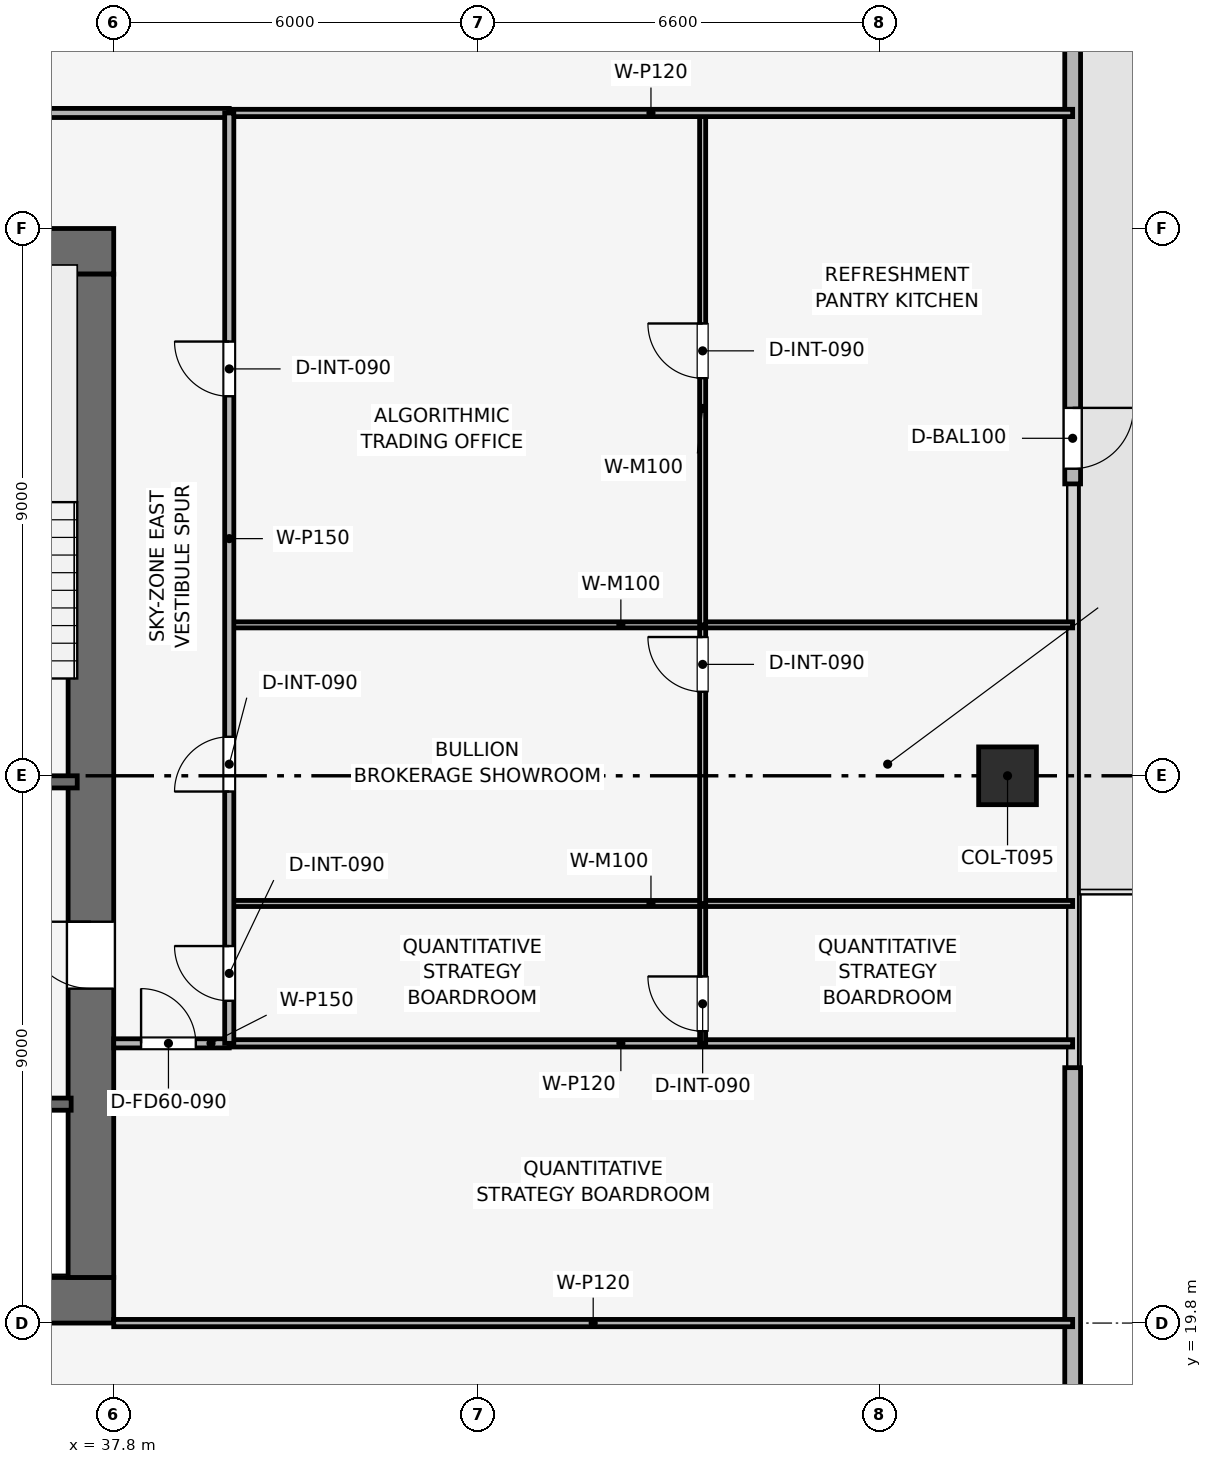
"""IFC4 building model, lengths in metres.
Left out: names, types, materials, properties, quantities, classifications, styles, units other than length and angle.
Written with IfcOpenShell. Run it as: python <this file> out.ifc"""

import sys

from ifc_helpers import new_model, si_unit, direction, frame, frame_2d, origin, origin_2d, place, context, subcontext, project, spatial, rectangle, extrude, element, fill, save


model = new_model("IFC4")
c1 = context("Model", 3, precision=1e-05, world=origin(), true_north=direction((0.0, 1.0)))
c2 = subcontext(c1, "Body", "Model", "MODEL_VIEW")
j1 = project(units=[si_unit("LENGTHUNIT", "METRE"), si_unit("PLANEANGLEUNIT", "RADIAN")], contexts=[c1])
p1 = place(None, origin())
s1 = spatial("IfcSite", under=j1, at=p1, CompositionType="ELEMENT")
p2 = place(p1, origin())
s2 = spatial("IfcBuilding", under=s1, at=p2, CompositionType="ELEMENT")
p3 = place(p2, frame((0.0, 0.0, 280.35)))
s3 = spatial("IfcBuildingStorey", under=s2, at=p3, CompositionType="ELEMENT", Elevation=280.35)
p4 = place(p3, frame((19.8, 20.175, 0.0), z_axis=(0.0, 0.0, 1.0), x_axis=(1.0, 0.0, 0.0)))
e1 = element("IfcWall", 1, at=p4, inside=s3, PredefinedType="SHEAR", context=c2, shape_type="SweptSolid", body=[
    extrude(rectangle(XDim=18.0, YDim=0.75, at=frame_2d((9.0, 0.0))), origin(), (0.0, 0.0, 1.0), 3.75),
])
p5 = place(p3, frame((19.8, 37.425, 0.0), z_axis=(0.0, 0.0, 1.0), x_axis=(1.0, 0.0, 0.0)))
e2 = element("IfcWall", 2, at=p5, inside=s3, PredefinedType="SHEAR", context=c2, shape_type="SweptSolid", body=[
    extrude(rectangle(XDim=18.0, YDim=0.75, at=frame_2d((9.0, 0.0))), origin(), (0.0, 0.0, 1.0), 3.75),
])
p6 = place(p5, frame((7.05, 0.0, 0.0)))
e3 = element("IfcOpeningElement", 3, at=p6, cuts=e2, PredefinedType="OPENING", context=c2, shape_type="SweptSolid", body=[
    extrude(rectangle(XDim=1.1, YDim=2.15, at=frame_2d((0.55, 1.075))), frame((0.0, 0.385, 0.0), z_axis=(0.0, -1.0, 0.0), x_axis=(1.0, 0.0, 0.0)), (0.0, 0.0, 1.0), 0.77),
])
p7 = place(p3, frame((37.425, 20.55, 0.0), z_axis=(0.0, 0.0, 1.0), x_axis=(0.0, 1.0, 0.0)))
e4 = element("IfcWall", 4, at=p7, inside=s3, PredefinedType="SHEAR", context=c2, shape_type="SweptSolid", body=[
    extrude(rectangle(XDim=16.5, YDim=0.75, at=frame_2d((8.25, 0.0))), origin(), (0.0, 0.0, 1.0), 3.75),
])
p8 = place(p7, frame((4.75, 0.0, 0.0)))
e5 = element("IfcOpeningElement", 5, at=p8, cuts=e4, PredefinedType="OPENING", context=c2, shape_type="SweptSolid", body=[
    extrude(rectangle(XDim=1.1, YDim=2.15, at=frame_2d((0.55, 1.075))), frame((0.0, 0.385, 0.0), z_axis=(0.0, -1.0, 0.0), x_axis=(1.0, 0.0, 0.0)), (0.0, 0.0, 1.0), 0.77),
])
p9 = place(p3, frame((52.499, 28.8, 0.003), z_axis=(-0.23333049931, 0.0, 0.97239748976), x_axis=(0.0, -1.0, 0.0)))
e6 = element("IfcColumn", 6, at=p9, inside=s3, PredefinedType="COLUMN", context=c2, shape_type="SweptSolid", body=[
    extrude(rectangle(XDim=0.95, YDim=0.95, at=origin_2d()), origin(), (0.0, 0.0, 1.0), 3.48),
])
p10 = place(p3, frame((53.57, 46.8, 0.0), z_axis=(0.0, 0.0, 1.0), x_axis=(0.0, -1.0, 0.0)))
e7 = element("IfcWall", 7, at=p10, inside=s3, PredefinedType="SOLIDWALL", context=c2, shape_type="SweptSolid", body=[
    extrude(rectangle(XDim=13.2, YDim=0.26, at=frame_2d((6.6, 0.0))), origin(), (0.0, 0.0, 1.0), 3.39),
])
p11 = place(p10, frame((11.95, 0.0, 0.0)))
e8 = element("IfcOpeningElement", 8, at=p11, cuts=e7, PredefinedType="OPENING", context=c2, shape_type="SweptSolid", body=[
    extrude(rectangle(XDim=1.0, YDim=2.2, at=frame_2d((0.5, 1.1))), frame((0.0, 0.14, 0.0), z_axis=(0.0, -1.0, 0.0), x_axis=(1.0, 0.0, 0.0)), (0.0, 0.0, 1.0), 0.28),
])
p12 = place(p3, frame((53.57, 24.0, 0.0), z_axis=(0.0, 0.0, 1.0), x_axis=(0.0, -1.0, 0.0)))
e9 = element("IfcWall", 9, at=p12, inside=s3, PredefinedType="SOLIDWALL", context=c2, shape_type="SweptSolid", body=[
    extrude(rectangle(XDim=13.2, YDim=0.26, at=frame_2d((6.6, 0.0))), origin(), (0.0, 0.0, 1.0), 3.39),
])
p13 = place(p12, frame((11.75, 0.0, 0.72)))
e10 = element("IfcOpeningElement", 10, at=p13, cuts=e9, PredefinedType="OPENING", context=c2, shape_type="SweptSolid", body=[
    extrude(rectangle(XDim=1.2, YDim=2.1, at=frame_2d((0.6, 1.05))), frame((0.0, 0.14, 0.0), z_axis=(0.0, -1.0, 0.0), x_axis=(1.0, 0.0, 0.0)), (0.0, 0.0, 1.0), 0.28),
])
p14 = place(p3, frame((34.05, 28.7, 0.0), z_axis=(0.0, 0.0, 1.0), x_axis=(1.0, 0.0, 0.0)))
e11 = element("IfcWall", 11, at=p14, inside=s3, PredefinedType="SHEAR", context=c2, shape_type="SweptSolid", body=[
    extrude(rectangle(XDim=3.15, YDim=0.2, at=frame_2d((1.575, 0.0))), origin(), (0.0, 0.0, 1.0), 3.39),
])
p15 = place(p14, frame((0.8, 0.0, 0.0)))
e12 = element("IfcOpeningElement", 12, at=p15, cuts=e11, PredefinedType="OPENING", context=c2, shape_type="SweptSolid", body=[
    extrude(rectangle(XDim=1.0, YDim=2.1, at=frame_2d((0.5, 1.05))), frame((0.0, 0.11, 0.0), z_axis=(0.0, -1.0, 0.0), x_axis=(1.0, 0.0, 0.0)), (0.0, 0.0, 1.0), 0.22),
])
p16 = place(p3, frame((34.05, 23.4, 0.0), z_axis=(0.0, 0.0, 1.0), x_axis=(1.0, 0.0, 0.0)))
e13 = element("IfcWall", 13, at=p16, inside=s3, PredefinedType="SHEAR", context=c2, shape_type="SweptSolid", body=[
    extrude(rectangle(XDim=3.05, YDim=0.2, at=frame_2d((1.525, 0.0))), origin(), (0.0, 0.0, 1.0), 3.39),
])
p17 = place(p16, frame((1.2, 0.0, 0.0)))
e14 = element("IfcOpeningElement", 14, at=p17, cuts=e13, PredefinedType="OPENING", context=c2, shape_type="SweptSolid", body=[
    extrude(rectangle(XDim=1.1, YDim=2.15, at=frame_2d((0.55, 1.075))), frame((0.0, 0.11, 0.0), z_axis=(0.0, -1.0, 0.0), x_axis=(1.0, 0.0, 0.0)), (0.0, 0.0, 1.0), 0.22),
])
p18 = place(p3, frame((37.8, 19.8, 0.0), z_axis=(0.0, 0.0, 1.0), x_axis=(1.0, 0.0, 0.0)))
e15 = element("IfcWall", 15, at=p18, inside=s3, PredefinedType="PARTITIONING", context=c2, shape_type="SweptSolid", body=[
    extrude(rectangle(XDim=15.77, YDim=0.12, at=frame_2d((7.885, 0.0))), origin(), (0.0, 0.0, 1.0), 2.975),
])
p19 = place(p3, frame((37.8, 24.4, 0.0), z_axis=(0.0, 0.0, 1.0), x_axis=(1.0, 0.0, 0.0)))
e16 = element("IfcWall", 16, at=p19, inside=s3, PredefinedType="PARTITIONING", context=c2, shape_type="SweptSolid", body=[
    extrude(rectangle(XDim=1.9, YDim=0.15, at=frame_2d((0.95, 0.0))), origin(), (0.0, 0.0, 1.0), 3.39),
])
p20 = place(p19, frame((0.45, 0.0, 0.0)))
e17 = element("IfcOpeningElement", 17, at=p20, cuts=e16, PredefinedType="OPENING", context=c2, shape_type="SweptSolid", body=[
    extrude(rectangle(XDim=0.9, YDim=2.1, at=frame_2d((0.45, 1.05))), frame((0.0, 0.085, 0.0), z_axis=(0.0, -1.0, 0.0), x_axis=(1.0, 0.0, 0.0)), (0.0, 0.0, 1.0), 0.17),
])
p21 = place(p3, frame((39.7, 24.4, 0.0), z_axis=(0.0, 0.0, 1.0), x_axis=(1.0, 0.0, 0.0)))
e18 = element("IfcWall", 18, at=p21, inside=s3, PredefinedType="PARTITIONING", context=c2, shape_type="SweptSolid", body=[
    extrude(rectangle(XDim=13.87, YDim=0.12, at=frame_2d((6.935, 0.0))), origin(), (0.0, 0.0, 1.0), 2.975),
])
p22 = place(p3, frame((47.485, 24.4, 0.0), z_axis=(0.0, 0.0, 1.0), x_axis=(0.0, 1.0, 0.0)))
e19 = element("IfcWall", 19, at=p22, inside=s3, PredefinedType="MOVABLE", context=c2, shape_type="SweptSolid", body=[
    extrude(rectangle(XDim=2.3, YDim=0.1, at=frame_2d((1.15, 0.0))), origin(), (0.0, 0.0, 1.0), 3.39),
])
p23 = place(p22, frame((0.2, 0.0, 0.0)))
e20 = element("IfcOpeningElement", 20, at=p23, cuts=e19, PredefinedType="OPENING", context=c2, shape_type="SweptSolid", body=[
    extrude(rectangle(XDim=0.9, YDim=2.1, at=frame_2d((0.45, 1.05))), frame((0.0, 0.06, 0.0), z_axis=(0.0, -1.0, 0.0), x_axis=(1.0, 0.0, 0.0)), (0.0, 0.0, 1.0), 0.12),
])
p24 = place(p3, frame((39.7, 26.7, 0.0), z_axis=(0.0, 0.0, 1.0), x_axis=(1.0, 0.0, 0.0)))
e21 = element("IfcWall", 21, at=p24, inside=s3, PredefinedType="MOVABLE", context=c2, shape_type="SweptSolid", body=[
    extrude(rectangle(XDim=13.87, YDim=0.1, at=frame_2d((6.935, 0.0))), origin(), (0.0, 0.0, 1.0), 2.975),
])
p25 = place(p3, frame((47.485, 26.7, 0.0), z_axis=(0.0, 0.0, 1.0), x_axis=(0.0, 1.0, 0.0)))
e22 = element("IfcWall", 22, at=p25, inside=s3, PredefinedType="MOVABLE", context=c2, shape_type="SweptSolid", body=[
    extrude(rectangle(XDim=4.582, YDim=0.1, at=frame_2d((2.291, 0.0))), origin(), (0.0, 0.0, 1.0), 2.975),
])
p26 = place(p25, frame((3.482, 0.0, 0.0)))
e23 = element("IfcOpeningElement", 23, at=p26, cuts=e22, PredefinedType="OPENING", context=c2, shape_type="SweptSolid", body=[
    extrude(rectangle(XDim=0.9, YDim=2.1, at=frame_2d((0.45, 1.05))), frame((0.0, 0.06, 0.0), z_axis=(0.0, -1.0, 0.0), x_axis=(1.0, 0.0, 0.0)), (0.0, 0.0, 1.0), 0.12),
])
p27 = place(p3, frame((39.7, 31.282, 0.0), z_axis=(0.0, 0.0, 1.0), x_axis=(1.0, 0.0, 0.0)))
e24 = element("IfcWall", 24, at=p27, inside=s3, PredefinedType="MOVABLE", context=c2, shape_type="SweptSolid", body=[
    extrude(rectangle(XDim=13.87, YDim=0.1, at=frame_2d((6.935, 0.0))), origin(), (0.0, 0.0, 1.0), 2.975),
])
p28 = place(p3, frame((47.485, 31.282, 0.0), z_axis=(0.0, 0.0, 1.0), x_axis=(0.0, 1.0, 0.0)))
e25 = element("IfcWall", 25, at=p28, inside=s3, PredefinedType="MOVABLE", context=c2, shape_type="SweptSolid", body=[
    extrude(rectangle(XDim=8.418, YDim=0.1, at=frame_2d((4.209, 0.0))), origin(), (0.0, 0.0, 1.0), 2.975),
])
p29 = place(p28, frame((4.056, 0.0, 0.0)))
e26 = element("IfcOpeningElement", 26, at=p29, cuts=e25, PredefinedType="OPENING", context=c2, shape_type="SweptSolid", body=[
    extrude(rectangle(XDim=0.9, YDim=2.1, at=frame_2d((0.45, 1.05))), frame((0.0, 0.06, 0.0), z_axis=(0.0, -1.0, 0.0), x_axis=(1.0, 0.0, 0.0)), (0.0, 0.0, 1.0), 0.12),
])
p30 = place(p3, frame((39.7, 39.7, 0.0), z_axis=(0.0, 0.0, 1.0), x_axis=(1.0, 0.0, 0.0)))
e27 = element("IfcWall", 27, at=p30, inside=s3, PredefinedType="PARTITIONING", context=c2, shape_type="SweptSolid", body=[
    extrude(rectangle(XDim=13.87, YDim=0.12, at=frame_2d((6.935, 0.0))), origin(), (0.0, 0.0, 1.0), 2.975),
])
p31 = place(p3, frame((17.9, 39.7, 0.0), z_axis=(0.0, 0.0, 1.0), x_axis=(1.0, 0.0, 0.0)))
e28 = element("IfcWall", 28, at=p31, inside=s3, PredefinedType="PARTITIONING", context=c2, shape_type="SweptSolid", body=[
    extrude(rectangle(XDim=21.8, YDim=0.15, at=frame_2d((10.9, 0.0))), origin(), (0.0, 0.0, 1.0), 2.975),
])
p32 = place(p31, frame((0.9, 0.0, 0.0)))
e29 = element("IfcOpeningElement", 29, at=p32, cuts=e28, PredefinedType="OPENING", context=c2, shape_type="SweptSolid", body=[
    extrude(rectangle(XDim=0.9, YDim=2.1, at=frame_2d((0.45, 1.05))), frame((0.0, 0.085, 0.0), z_axis=(0.0, -1.0, 0.0), x_axis=(1.0, 0.0, 0.0)), (0.0, 0.0, 1.0), 0.17),
])
p33 = place(p31, frame((3.65, 0.0, 0.0)))
e30 = element("IfcOpeningElement", 30, at=p33, cuts=e28, PredefinedType="OPENING", context=c2, shape_type="SweptSolid", body=[
    extrude(rectangle(XDim=0.9, YDim=2.1, at=frame_2d((0.45, 1.05))), frame((0.0, 0.085, 0.0), z_axis=(0.0, -1.0, 0.0), x_axis=(1.0, 0.0, 0.0)), (0.0, 0.0, 1.0), 0.17),
])
p34 = place(p31, frame((6.55, 0.0, 0.0)))
e31 = element("IfcOpeningElement", 31, at=p34, cuts=e28, PredefinedType="OPENING", context=c2, shape_type="SweptSolid", body=[
    extrude(rectangle(XDim=0.9, YDim=2.1, at=frame_2d((0.45, 1.05))), frame((0.0, 0.085, 0.0), z_axis=(0.0, -1.0, 0.0), x_axis=(1.0, 0.0, 0.0)), (0.0, 0.0, 1.0), 0.17),
])
p35 = place(p31, frame((9.3, 0.0, 0.0)))
e32 = element("IfcOpeningElement", 32, at=p35, cuts=e28, PredefinedType="OPENING", context=c2, shape_type="SweptSolid", body=[
    extrude(rectangle(XDim=0.95, YDim=2.1, at=frame_2d((0.475, 1.05))), frame((0.0, 0.085, 0.0), z_axis=(0.0, -1.0, 0.0), x_axis=(1.0, 0.0, 0.0)), (0.0, 0.0, 1.0), 0.17),
])
p36 = place(p31, frame((16.0, 0.0, 0.0)))
e33 = element("IfcOpeningElement", 33, at=p36, cuts=e28, PredefinedType="OPENING", context=c2, shape_type="SweptSolid", body=[
    extrude(rectangle(XDim=0.9, YDim=2.1, at=frame_2d((0.45, 1.05))), frame((0.0, 0.085, 0.0), z_axis=(0.0, -1.0, 0.0), x_axis=(1.0, 0.0, 0.0)), (0.0, 0.0, 1.0), 0.17),
])
p37 = place(p3, frame((39.7, 24.4, 0.0), z_axis=(0.0, 0.0, 1.0), x_axis=(0.0, 1.0, 0.0)))
e34 = element("IfcWall", 34, at=p37, inside=s3, PredefinedType="PARTITIONING", context=c2, shape_type="SweptSolid", body=[
    extrude(rectangle(XDim=15.3, YDim=0.15, at=frame_2d((7.65, 0.0))), origin(), (0.0, 0.0, 1.0), 2.975),
])
p38 = place(p37, frame((0.7, 0.0, 0.0)))
e35 = element("IfcOpeningElement", 35, at=p38, cuts=e34, PredefinedType="OPENING", context=c2, shape_type="SweptSolid", body=[
    extrude(rectangle(XDim=0.9, YDim=2.1, at=frame_2d((0.45, 1.05))), frame((0.0, 0.085, 0.0), z_axis=(0.0, -1.0, 0.0), x_axis=(1.0, 0.0, 0.0)), (0.0, 0.0, 1.0), 0.17),
])
p39 = place(p37, frame((4.141, 0.0, 0.0)))
e36 = element("IfcOpeningElement", 36, at=p39, cuts=e34, PredefinedType="OPENING", context=c2, shape_type="SweptSolid", body=[
    extrude(rectangle(XDim=0.9, YDim=2.1, at=frame_2d((0.45, 1.05))), frame((0.0, 0.085, 0.0), z_axis=(0.0, -1.0, 0.0), x_axis=(1.0, 0.0, 0.0)), (0.0, 0.0, 1.0), 0.17),
])
p40 = place(p37, frame((10.641, 0.0, 0.0)))
e37 = element("IfcOpeningElement", 37, at=p40, cuts=e34, PredefinedType="OPENING", context=c2, shape_type="SweptSolid", body=[
    extrude(rectangle(XDim=0.9, YDim=2.1, at=frame_2d((0.45, 1.05))), frame((0.0, 0.085, 0.0), z_axis=(0.0, -1.0, 0.0), x_axis=(1.0, 0.0, 0.0)), (0.0, 0.0, 1.0), 0.17),
])
p41 = place(p11, origin())
e38 = element("IfcDoor", 38, at=p41, inside=s3, OperationType="SINGLE_SWING_LEFT", PredefinedType="DOOR", context=c2, shape_type="SweptSolid", body=[
    extrude(rectangle(XDim=1.0, YDim=2.2, at=frame_2d((0.5, 1.1))), frame((0.0, 0.025, 0.0), z_axis=(0.0, -1.0, 0.0), x_axis=(1.0, 0.0, 0.0)), (0.0, 0.0, 1.0), 0.05),
])
fill(e8, e38)
p42 = place(p20, origin())
e39 = element("IfcDoor", 39, at=p42, inside=s3, OperationType="SINGLE_SWING_LEFT", PredefinedType="DOOR", context=c2, shape_type="SweptSolid", body=[
    extrude(rectangle(XDim=0.9, YDim=2.1, at=frame_2d((0.45, 1.05))), frame((0.0, 0.025, 0.0), z_axis=(0.0, -1.0, 0.0), x_axis=(1.0, 0.0, 0.0)), (0.0, 0.0, 1.0), 0.05),
])
fill(e17, e39)
p43 = place(p23, origin())
e40 = element("IfcDoor", 40, at=p43, inside=s3, OperationType="SINGLE_SWING_RIGHT", PredefinedType="DOOR", context=c2, shape_type="SweptSolid", body=[
    extrude(rectangle(XDim=0.9, YDim=2.1, at=frame_2d((0.45, 1.05))), frame((0.0, 0.025, 0.0), z_axis=(0.0, -1.0, 0.0), x_axis=(1.0, 0.0, 0.0)), (0.0, 0.0, 1.0), 0.05),
])
fill(e20, e40)
p44 = place(p26, origin())
e41 = element("IfcDoor", 41, at=p44, inside=s3, OperationType="SINGLE_SWING_RIGHT", PredefinedType="DOOR", context=c2, shape_type="SweptSolid", body=[
    extrude(rectangle(XDim=0.9, YDim=2.1, at=frame_2d((0.45, 1.05))), frame((0.0, 0.025, 0.0), z_axis=(0.0, -1.0, 0.0), x_axis=(1.0, 0.0, 0.0)), (0.0, 0.0, 1.0), 0.05),
])
fill(e23, e41)
p45 = place(p29, origin())
e42 = element("IfcDoor", 42, at=p45, inside=s3, OperationType="SINGLE_SWING_RIGHT", PredefinedType="DOOR", context=c2, shape_type="SweptSolid", body=[
    extrude(rectangle(XDim=0.9, YDim=2.1, at=frame_2d((0.45, 1.05))), frame((0.0, 0.025, 0.0), z_axis=(0.0, -1.0, 0.0), x_axis=(1.0, 0.0, 0.0)), (0.0, 0.0, 1.0), 0.05),
])
fill(e26, e42)
p46 = place(p38, origin())
e43 = element("IfcDoor", 43, at=p46, inside=s3, OperationType="SINGLE_SWING_RIGHT", PredefinedType="DOOR", context=c2, shape_type="SweptSolid", body=[
    extrude(rectangle(XDim=0.9, YDim=2.1, at=frame_2d((0.45, 1.05))), frame((0.0, 0.025, 0.0), z_axis=(0.0, -1.0, 0.0), x_axis=(1.0, 0.0, 0.0)), (0.0, 0.0, 1.0), 0.05),
])
fill(e35, e43)
p47 = place(p39, origin())
e44 = element("IfcDoor", 44, at=p47, inside=s3, OperationType="SINGLE_SWING_LEFT", PredefinedType="DOOR", context=c2, shape_type="SweptSolid", body=[
    extrude(rectangle(XDim=0.9, YDim=2.1, at=frame_2d((0.45, 1.05))), frame((0.0, 0.025, 0.0), z_axis=(0.0, -1.0, 0.0), x_axis=(1.0, 0.0, 0.0)), (0.0, 0.0, 1.0), 0.05),
])
fill(e36, e44)
p48 = place(p40, origin())
e45 = element("IfcDoor", 45, at=p48, inside=s3, OperationType="SINGLE_SWING_RIGHT", PredefinedType="DOOR", context=c2, shape_type="SweptSolid", body=[
    extrude(rectangle(XDim=0.9, YDim=2.1, at=frame_2d((0.45, 1.05))), frame((0.0, 0.025, 0.0), z_axis=(0.0, -1.0, 0.0), x_axis=(1.0, 0.0, 0.0)), (0.0, 0.0, 1.0), 0.05),
])
fill(e37, e45)
p49 = place(p8, origin())
e46 = element("IfcDoor", 46, at=p49, inside=s3, OperationType="SINGLE_SWING_RIGHT", PredefinedType="DOOR", context=c2, shape_type="SweptSolid", body=[
    extrude(rectangle(XDim=1.1, YDim=2.15, at=frame_2d((0.55, 1.075))), frame((0.0, 0.025, 0.0), z_axis=(0.0, -1.0, 0.0), x_axis=(1.0, 0.0, 0.0)), (0.0, 0.0, 1.0), 0.05),
])
fill(e5, e46)
save(model, sys.argv[1])
